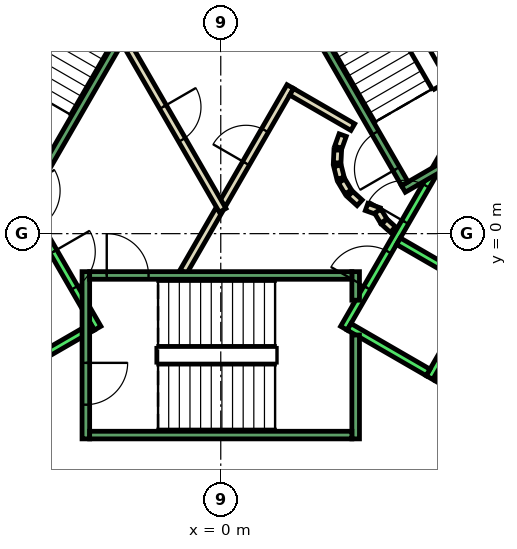
"""IFC4 building model, lengths in metres.
Left out: names, types, materials, properties, quantities, classifications, styles, units other than length and angle.
Written with IfcOpenShell. Run it as: python <this file> out.ifc"""

import sys

from ifc_helpers import new_model, si_unit, direction, frame, frame_2d, origin, place, context, subcontext, project, spatial, rectangle, extrude, element, fill, save


model = new_model("IFC4")
c1 = context("Model", 3, precision=1e-05, world=origin(), true_north=direction((0.0, 1.0)))
c2 = subcontext(c1, "Body", "Model", "MODEL_VIEW")
j1 = project(units=[si_unit("LENGTHUNIT", "METRE"), si_unit("PLANEANGLEUNIT", "RADIAN")], contexts=[c1])
p1 = place(None, origin())
s1 = spatial("IfcSite", under=j1, at=p1, CompositionType="ELEMENT")
p2 = place(p1, origin())
s2 = spatial("IfcBuilding", under=s1, at=p2, CompositionType="ELEMENT")
p3 = place(p2, frame((0.0, 0.0, 198.2)))
s3 = spatial("IfcBuildingStorey", under=s2, at=p3, CompositionType="ELEMENT", Elevation=198.2)
p4 = place(p3, frame((5.751, -3.938, 0.0), z_axis=(0.0, 0.0, 1.0), x_axis=(0.49994636267, 0.866056369097, 0.0)))
e1 = element("IfcWall", 1, at=p4, inside=s3, PredefinedType="PARTITIONING", context=c2, shape_type="SweptSolid", body=[
    extrude(rectangle(XDim=2.8, YDim=0.2, at=frame_2d((1.4, 0.0))), origin(), (0.0, 0.0, 1.0), 3.8),
])
p5 = place(p3, frame((-0.982, -1.0, 0.0), z_axis=(0.0, 0.0, 1.0), x_axis=(0.50024047865, 0.865886518847, 0.0)))
e2 = element("IfcWall", 2, at=p5, inside=s3, PredefinedType="PARTITIONING", context=c2, shape_type="SweptSolid", body=[
    extrude(rectangle(XDim=1.863, YDim=0.2, at=frame_2d((0.931, 0.0))), origin(), (0.0, 0.0, 1.0), 3.8),
])
p6 = place(p3, frame((0.05, 0.787, 0.0), z_axis=(0.0, 0.0, 1.0), x_axis=(0.499954076797, 0.866051915934, 0.0)))
e3 = element("IfcWall", 3, at=p6, inside=s3, PredefinedType="PARTITIONING", context=c2, shape_type="SweptSolid", body=[
    extrude(rectangle(XDim=3.558, YDim=0.2, at=frame_2d((1.779, 0.0))), origin(), (0.0, 0.0, 1.0), 3.8),
])
p7 = place(p6, frame((1.229, 0.0, 0.0)))
e4 = element("IfcOpeningElement", 4, at=p7, cuts=e3, PredefinedType="OPENING", context=c2, shape_type="SweptSolid", body=[
    extrude(rectangle(XDim=1.0, YDim=2.1, at=frame_2d((0.5, 1.05))), frame((0.0, 0.11, 0.0), z_axis=(0.0, -1.0, 0.0), x_axis=(1.0, 0.0, 0.0)), (0.0, 0.0, 1.0), 0.22),
])
p8 = place(p3, frame((1.866, 3.732, 0.0), z_axis=(0.0, 0.0, 1.0), x_axis=(0.866043361281, -0.499968895414, 0.0)))
e5 = element("IfcWall", 5, at=p8, inside=s3, PredefinedType="PARTITIONING", context=c2, shape_type="SweptSolid", body=[
    extrude(rectangle(XDim=1.858, YDim=0.2, at=frame_2d((0.929, 0.0))), origin(), (0.0, 0.0, 1.0), 3.8),
])
p9 = place(p3, frame((3.208, 2.592, 0.0), z_axis=(0.0, 0.0, 1.0), x_axis=(-0.337388820924, -0.941365382578, 0.0)))
e6 = element("IfcWall", 6, at=p9, inside=s3, PredefinedType="PARTITIONING", context=c2, shape_type="SweptSolid", body=[
    extrude(rectangle(XDim=0.338, YDim=0.2, at=frame_2d((0.169, 0.0))), origin(), (0.0, 0.0, 1.0), 3.8),
])
p10 = place(p3, frame((3.079, 2.199, 0.0), z_axis=(0.0, 0.0, 1.0), x_axis=(-0.047771483479, -0.998858290933, 0.0)))
e7 = element("IfcWall", 7, at=p10, inside=s3, PredefinedType="PARTITIONING", context=c2, shape_type="SweptSolid", body=[
    extrude(rectangle(XDim=0.337, YDim=0.2, at=frame_2d((0.169, 0.0))), origin(), (0.0, 0.0, 1.0), 3.8),
])
p11 = place(p3, frame((3.07, 1.786, 0.0), z_axis=(0.0, 0.0, 1.0), x_axis=(0.242705583207, -0.970099994784, 0.0)))
e8 = element("IfcWall", 8, at=p11, inside=s3, PredefinedType="PARTITIONING", context=c2, shape_type="SweptSolid", body=[
    extrude(rectangle(XDim=0.338, YDim=0.2, at=frame_2d((0.169, 0.0))), origin(), (0.0, 0.0, 1.0), 3.8),
])
for number, where, z_axis, x_axis in (
    (9, (3.182, 1.388, 0.0), (0.0, 0.0, 1.0), (0.512, -0.859, 0.0)),
    (10, (3.404, 1.039, 0.0), (0.0, 0.0, 1.0), (0.74, -0.672, 0.0)),
):
    element("IfcWall", number, at=place(p3, frame(where, z_axis=z_axis, x_axis=x_axis)), inside=s3, PredefinedType="PARTITIONING", context=c2, shape_type="SweptSolid", body=[
        extrude(rectangle(XDim=0.338, YDim=0.2, at=frame_2d((0.169, 0.0))), origin(), (0.0, 0.0, 1.0), 3.8),
    ])
p12 = place(p3, frame((3.838, 0.702, 0.0), z_axis=(0.0, 0.0, 1.0), x_axis=(0.941035081519, -0.338308993895, 0.0)))
e11 = element("IfcWall", 11, at=p12, inside=s3, PredefinedType="PARTITIONING", context=c2, shape_type="SweptSolid", body=[
    extrude(rectangle(XDim=0.337, YDim=0.2, at=frame_2d((0.168, 0.0))), origin(), (0.0, 0.0, 1.0), 3.8),
])
p13 = place(p3, frame((4.132, 0.593, 0.0), z_axis=(0.0, 0.0, 1.0), x_axis=(0.513561617048, -0.858052717201, 0.0)))
e12 = element("IfcWall", 12, at=p13, inside=s3, PredefinedType="PARTITIONING", context=c2, shape_type="SweptSolid", body=[
    extrude(rectangle(XDim=0.308, YDim=0.2, at=frame_2d((0.154, 0.0))), origin(), (0.0, 0.0, 1.0), 3.8),
])
p14 = place(p3, frame((4.301, 0.315, 0.0), z_axis=(0.0, 0.0, 1.0), x_axis=(0.741798017506, -0.670623367639, 0.0)))
e13 = element("IfcWall", 13, at=p14, inside=s3, PredefinedType="PARTITIONING", context=c2, shape_type="SweptSolid", body=[
    extrude(rectangle(XDim=0.309, YDim=0.2, at=frame_2d((0.154, 0.0))), origin(), (0.0, 0.0, 1.0), 3.8),
])
p15 = place(p3, frame((-2.54, 5.1, 0.0), z_axis=(0.0, 0.0, 1.0), x_axis=(0.499925051871, -0.866068670783, 0.0)))
e14 = element("IfcWall", 14, at=p15, inside=s3, PredefinedType="PARTITIONING", context=c2, shape_type="SweptSolid", body=[
    extrude(rectangle(XDim=5.181, YDim=0.2, at=frame_2d((2.59, 0.0))), origin(), (0.0, 0.0, 1.0), 3.8),
])
p16 = place(p15, frame((2.04, 0.0, 0.0)))
e15 = element("IfcOpeningElement", 15, at=p16, cuts=e14, PredefinedType="OPENING", context=c2, shape_type="SweptSolid", body=[
    extrude(rectangle(XDim=1.0, YDim=2.1, at=frame_2d((0.5, 1.05))), frame((0.0, 0.11, 0.0), z_axis=(0.0, -1.0, 0.0), x_axis=(1.0, 0.0, 0.0)), (0.0, 0.0, 1.0), 0.22),
])
p17 = place(p3, frame((-5.94, 2.188, 0.0), z_axis=(0.0, 0.0, 1.0), x_axis=(0.500034260056, -0.866005622828, 0.0)))
e16 = element("IfcWall", 16, at=p17, inside=s3, PredefinedType="STANDARD", context=c2, shape_type="SweptSolid", body=[
    extrude(rectangle(XDim=5.399, YDim=0.2, at=frame_2d((2.7, 0.0))), origin(), (0.0, 0.0, 1.0), 3.8),
])
p18 = place(p17, frame((3.075, 0.0, 0.0)))
e17 = element("IfcOpeningElement", 17, at=p18, cuts=e16, PredefinedType="OPENING", context=c2, shape_type="SweptSolid", body=[
    extrude(rectangle(XDim=1.1, YDim=2.1, at=frame_2d((0.55, 1.05))), frame((0.0, 0.11, 0.0), z_axis=(0.0, -1.0, 0.0), x_axis=(1.0, 0.0, 0.0)), (0.0, 0.0, 1.0), 0.22),
])
p19 = place(p17, frame((1.225, 0.0, 0.0)))
e18 = element("IfcOpeningElement", 18, at=p19, cuts=e16, PredefinedType="OPENING", context=c2, shape_type="SweptSolid", body=[
    extrude(rectangle(XDim=1.1, YDim=2.1, at=frame_2d((0.55, 1.05))), frame((0.0, 0.11, 0.0), z_axis=(0.0, -1.0, 0.0), x_axis=(1.0, 0.0, 0.0)), (0.0, 0.0, 1.0), 0.22),
])
p20 = place(p3, frame((-3.377, -2.452, 0.0), z_axis=(0.0, 0.0, 1.0), x_axis=(-0.865955154139, -0.50012165622, 0.0)))
e19 = element("IfcWall", 19, at=p20, inside=s3, PredefinedType="STANDARD", context=c2, shape_type="SweptSolid", body=[
    extrude(rectangle(XDim=2.4, YDim=0.2, at=frame_2d((1.2, 0.0))), origin(), (0.0, 0.0, 1.0), 3.8),
])
p21 = place(p3, frame((3.24, -2.488, 0.0), z_axis=(0.0, 0.0, 1.0), x_axis=(0.500034260056, 0.866005622828, 0.0)))
e20 = element("IfcWall", 20, at=p21, inside=s3, PredefinedType="STANDARD", context=c2, shape_type="SweptSolid", body=[
    extrude(rectangle(XDim=5.399, YDim=0.2, at=frame_2d((2.7, 0.0))), origin(), (0.0, 0.0, 1.0), 3.8),
])
p22 = place(p21, frame((3.225, 0.0, 0.0)))
e21 = element("IfcOpeningElement", 21, at=p22, cuts=e20, PredefinedType="OPENING", context=c2, shape_type="SweptSolid", body=[
    extrude(rectangle(XDim=1.1, YDim=2.1, at=frame_2d((0.55, 1.05))), frame((0.0, 0.11, 0.0), z_axis=(0.0, -1.0, 0.0), x_axis=(1.0, 0.0, 0.0)), (0.0, 0.0, 1.0), 0.22),
])
p23 = place(p21, frame((1.225, 0.0, 0.0)))
e22 = element("IfcOpeningElement", 22, at=p23, cuts=e20, PredefinedType="OPENING", context=c2, shape_type="SweptSolid", body=[
    extrude(rectangle(XDim=1.1, YDim=2.1, at=frame_2d((0.55, 1.05))), frame((0.0, 0.11, 0.0), z_axis=(0.0, -1.0, 0.0), x_axis=(1.0, 0.0, 0.0)), (0.0, 0.0, 1.0), 0.22),
])
p24 = place(p3, frame((5.492, -3.788, 0.0), z_axis=(0.0, 0.0, 1.0), x_axis=(0.500034260056, 0.866005622828, 0.0)))
e23 = element("IfcWall", 23, at=p24, inside=s3, PredefinedType="STANDARD", context=c2, shape_type="SweptSolid", body=[
    extrude(rectangle(XDim=5.399, YDim=0.2, at=frame_2d((2.7, 0.0))), origin(), (0.0, 0.0, 1.0), 3.8),
])
p25 = place(p3, frame((3.377, -2.452, 0.0), z_axis=(0.0, 0.0, 1.0), x_axis=(0.865955154139, -0.50012165622, 0.0)))
e24 = element("IfcWall", 24, at=p25, inside=s3, PredefinedType="STANDARD", context=c2, shape_type="SweptSolid", body=[
    extrude(rectangle(XDim=2.4, YDim=0.2, at=frame_2d((1.2, 0.0))), origin(), (0.0, 0.0, 1.0), 3.8),
])
p26 = place(p3, frame((4.677, -0.2, 0.0), z_axis=(0.0, 0.0, 1.0), x_axis=(0.865973769406, -0.500089422704, 0.0)))
e25 = element("IfcWall", 25, at=p26, inside=s3, PredefinedType="STANDARD", context=c2, shape_type="SweptSolid", body=[
    extrude(rectangle(XDim=2.399, YDim=0.2, at=frame_2d((1.2, 0.0))), origin(), (0.0, 0.0, 1.0), 3.8),
])
p27 = place(p3, frame((-3.55, -1.0, 0.0), z_axis=(0.0, 0.0, 1.0), x_axis=(0.0, -1.0, 0.0)))
e26 = element("IfcWall", 26, at=p27, inside=s3, PredefinedType="STANDARD", context=c2, shape_type="SweptSolid", body=[
    extrude(rectangle(XDim=4.4, YDim=0.2, at=frame_2d((2.2, 0.0))), origin(), (0.0, 0.0, 1.0), 3.8),
])
p28 = place(p27, frame((2.4, 0.0, 0.0)))
e27 = element("IfcOpeningElement", 27, at=p28, cuts=e26, PredefinedType="OPENING", context=c2, shape_type="SweptSolid", body=[
    extrude(rectangle(XDim=1.1, YDim=2.2, at=frame_2d((0.55, 1.1))), frame((0.0, 0.11, 0.0), z_axis=(0.0, -1.0, 0.0), x_axis=(1.0, 0.0, 0.0)), (0.0, 0.0, 1.0), 0.22),
])
p29 = place(p3, frame((3.55, -2.667, 0.0), z_axis=(0.0, 0.0, 1.0), x_axis=(0.0, -1.0, 0.0)))
e28 = element("IfcWall", 28, at=p29, inside=s3, PredefinedType="STANDARD", context=c2, shape_type="SweptSolid", body=[
    extrude(rectangle(XDim=2.733, YDim=0.2, at=frame_2d((1.366, 0.0))), origin(), (0.0, 0.0, 1.0), 3.8),
])
p30 = place(p3, frame((3.55, -1.0, 0.0), z_axis=(0.0, 0.0, 1.0), x_axis=(0.0, -1.0, 0.0)))
e29 = element("IfcWall", 29, at=p30, inside=s3, PredefinedType="STANDARD", context=c2, shape_type="SweptSolid", body=[
    extrude(rectangle(XDim=0.751, YDim=0.2, at=frame_2d((0.375, 0.0))), origin(), (0.0, 0.0, 1.0), 3.8),
])
p31 = place(p3, frame((-3.45, -1.1, 0.0), z_axis=(0.0, 0.0, 1.0), x_axis=(1.0, 0.0, 0.0)))
e30 = element("IfcWall", 30, at=p31, inside=s3, PredefinedType="STANDARD", context=c2, shape_type="SweptSolid", body=[
    extrude(rectangle(XDim=6.9, YDim=0.2, at=frame_2d((3.45, 0.0))), origin(), (0.0, 0.0, 1.0), 3.8),
])
p32 = place(p31, frame((0.45, 0.0, 0.0)))
e31 = element("IfcOpeningElement", 31, at=p32, cuts=e30, PredefinedType="OPENING", context=c2, shape_type="SweptSolid", body=[
    extrude(rectangle(XDim=1.1, YDim=2.2, at=frame_2d((0.55, 1.1))), frame((0.0, 0.11, 0.0), z_axis=(0.0, -1.0, 0.0), x_axis=(1.0, 0.0, 0.0)), (0.0, 0.0, 1.0), 0.22),
])
p33 = place(p3, frame((-3.45, -5.3, 0.0), z_axis=(0.0, 0.0, 1.0), x_axis=(1.0, 0.0, 0.0)))
e32 = element("IfcWall", 32, at=p33, inside=s3, PredefinedType="STANDARD", context=c2, shape_type="SweptSolid", body=[
    extrude(rectangle(XDim=6.9, YDim=0.2, at=frame_2d((3.45, 0.0))), origin(), (0.0, 0.0, 1.0), 3.8),
])
p34 = place(p3, frame((4.806, 1.176, 0.0), z_axis=(0.0, 0.0, 1.0), x_axis=(0.866059941101, 0.499940174841, 0.0)))
e33 = element("IfcWall", 33, at=p34, inside=s3, PredefinedType="STANDARD", context=c2, shape_type="SweptSolid", body=[
    extrude(rectangle(XDim=4.4, YDim=0.2, at=frame_2d((2.2, 0.0))), origin(), (0.0, 0.0, 1.0), 3.8),
])
p35 = place(p34, frame((2.4, 0.0, 0.0)))
e34 = element("IfcOpeningElement", 34, at=p35, cuts=e33, PredefinedType="OPENING", context=c2, shape_type="SweptSolid", body=[
    extrude(rectangle(XDim=1.1, YDim=2.2, at=frame_2d((0.55, 1.1))), frame((0.0, 0.11, 0.0), z_axis=(0.0, -1.0, 0.0), x_axis=(1.0, 0.0, 0.0)), (0.0, 0.0, 1.0), 0.22),
])
p36 = place(p3, frame((4.843, 1.312, 0.0), z_axis=(0.0, 0.0, 1.0), x_axis=(-0.499963383562, 0.866046543262, 0.0)))
e35 = element("IfcWall", 35, at=p36, inside=s3, PredefinedType="STANDARD", context=c2, shape_type="SweptSolid", body=[
    extrude(rectangle(XDim=6.9, YDim=0.2, at=frame_2d((3.45, 0.0))), origin(), (0.0, 0.0, 1.0), 3.8),
])
p37 = place(p36, frame((0.45, 0.0, 0.0)))
e36 = element("IfcOpeningElement", 36, at=p37, cuts=e35, PredefinedType="OPENING", context=c2, shape_type="SweptSolid", body=[
    extrude(rectangle(XDim=1.1, YDim=2.2, at=frame_2d((0.55, 1.1))), frame((0.0, 0.11, 0.0), z_axis=(0.0, -1.0, 0.0), x_axis=(1.0, 0.0, 0.0)), (0.0, 0.0, 1.0), 0.22),
])
p38 = place(p3, frame((8.48, 3.412, 0.0), z_axis=(0.0, 0.0, 1.0), x_axis=(-0.499978703459, 0.866037698999, 0.0)))
e37 = element("IfcWall", 37, at=p38, inside=s3, PredefinedType="STANDARD", context=c2, shape_type="SweptSolid", body=[
    extrude(rectangle(XDim=6.9, YDim=0.2, at=frame_2d((3.45, 0.0))), origin(), (0.0, 0.0, 1.0), 3.8),
])
p39 = place(p3, frame((-1.393, 7.288, 0.0), z_axis=(0.0, 0.0, 1.0), x_axis=(-0.499963383562, -0.866046543262, 0.0)))
e38 = element("IfcWall", 38, at=p39, inside=s3, PredefinedType="STANDARD", context=c2, shape_type="SweptSolid", body=[
    extrude(rectangle(XDim=6.9, YDim=0.2, at=frame_2d((3.45, 0.0))), origin(), (0.0, 0.0, 1.0), 3.8),
])
p40 = place(p39, frame((0.45, 0.0, 0.0)))
e39 = element("IfcOpeningElement", 39, at=p40, cuts=e38, PredefinedType="OPENING", context=c2, shape_type="SweptSolid", body=[
    extrude(rectangle(XDim=1.1, YDim=2.2, at=frame_2d((0.55, 1.1))), frame((0.0, 0.11, 0.0), z_axis=(0.0, -1.0, 0.0), x_axis=(1.0, 0.0, 0.0)), (0.0, 0.0, 1.0), 0.22),
])
p41 = place(p7, origin())
e40 = element("IfcDoor", 40, at=p41, inside=s3, OperationType="SINGLE_SWING_RIGHT", PredefinedType="DOOR", context=c2, shape_type="SweptSolid", body=[
    extrude(rectangle(XDim=1.0, YDim=2.1, at=frame_2d((0.5, 1.05))), frame((0.0, 0.025, 0.0), z_axis=(0.0, -1.0, 0.0), x_axis=(1.0, 0.0, 0.0)), (0.0, 0.0, 1.0), 0.05),
])
fill(e4, e40)
p42 = place(p16, origin())
e41 = element("IfcDoor", 41, at=p42, inside=s3, OperationType="SINGLE_SWING_RIGHT", PredefinedType="DOOR", context=c2, shape_type="SweptSolid", body=[
    extrude(rectangle(XDim=1.0, YDim=2.1, at=frame_2d((0.5, 1.05))), frame((0.0, 0.025, 0.0), z_axis=(0.0, -1.0, 0.0), x_axis=(1.0, 0.0, 0.0)), (0.0, 0.0, 1.0), 0.05),
])
fill(e15, e41)
p43 = place(p22, origin())
e42 = element("IfcDoor", 42, at=p43, inside=s3, OperationType="SLIDING_TO_LEFT", PredefinedType="DOOR", context=c2, shape_type="SweptSolid", body=[
    extrude(rectangle(XDim=1.1, YDim=2.1, at=frame_2d((0.55, 1.05))), frame((0.0, 0.025, 0.0), z_axis=(0.0, -1.0, 0.0), x_axis=(1.0, 0.0, 0.0)), (0.0, 0.0, 1.0), 0.05),
])
fill(e21, e42)
p44 = place(p18, origin())
e43 = element("IfcDoor", 43, at=p44, inside=s3, OperationType="SLIDING_TO_LEFT", PredefinedType="DOOR", context=c2, shape_type="SweptSolid", body=[
    extrude(rectangle(XDim=1.1, YDim=2.1, at=frame_2d((0.55, 1.05))), frame((0.0, 0.025, 0.0), z_axis=(0.0, -1.0, 0.0), x_axis=(1.0, 0.0, 0.0)), (0.0, 0.0, 1.0), 0.05),
])
fill(e17, e43)
p45 = place(p23, origin())
e44 = element("IfcDoor", 44, at=p45, inside=s3, OperationType="SLIDING_TO_LEFT", PredefinedType="DOOR", context=c2, shape_type="SweptSolid", body=[
    extrude(rectangle(XDim=1.1, YDim=2.1, at=frame_2d((0.55, 1.05))), frame((0.0, 0.025, 0.0), z_axis=(0.0, -1.0, 0.0), x_axis=(1.0, 0.0, 0.0)), (0.0, 0.0, 1.0), 0.05),
])
fill(e22, e44)
p46 = place(p32, origin())
e45 = element("IfcDoor", 45, at=p46, inside=s3, OperationType="SINGLE_SWING_LEFT", PredefinedType="DOOR", context=c2, shape_type="SweptSolid", body=[
    extrude(rectangle(XDim=1.1, YDim=2.2, at=frame_2d((0.55, 1.1))), frame((0.0, 0.025, 0.0), z_axis=(0.0, -1.0, 0.0), x_axis=(1.0, 0.0, 0.0)), (0.0, 0.0, 1.0), 0.05),
])
fill(e31, e45)
p47 = place(p28, origin())
e46 = element("IfcDoor", 46, at=p47, inside=s3, OperationType="SINGLE_SWING_LEFT", PredefinedType="DOOR", context=c2, shape_type="SweptSolid", body=[
    extrude(rectangle(XDim=1.1, YDim=2.2, at=frame_2d((0.55, 1.1))), frame((0.0, 0.025, 0.0), z_axis=(0.0, -1.0, 0.0), x_axis=(1.0, 0.0, 0.0)), (0.0, 0.0, 1.0), 0.05),
])
fill(e27, e46)
p48 = place(p37, origin())
e47 = element("IfcDoor", 47, at=p48, inside=s3, OperationType="SINGLE_SWING_LEFT", PredefinedType="DOOR", context=c2, shape_type="SweptSolid", body=[
    extrude(rectangle(XDim=1.1, YDim=2.2, at=frame_2d((0.55, 1.1))), frame((0.0, 0.025, 0.0), z_axis=(0.0, -1.0, 0.0), x_axis=(1.0, 0.0, 0.0)), (0.0, 0.0, 1.0), 0.05),
])
fill(e36, e47)
save(model, sys.argv[1])
